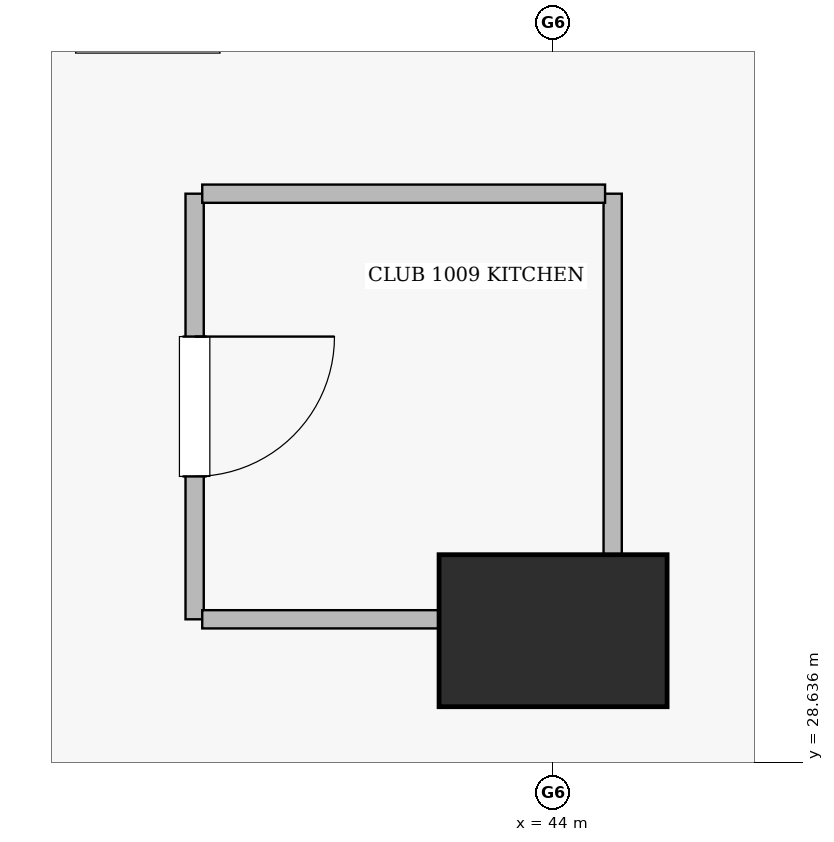
"""IFC4 building model, lengths in metres.
Left out: names, types, materials, properties, quantities, classifications, styles, units other than length and angle.
Written with IfcOpenShell. Run it as: python <this file> out.ifc"""

import sys

from ifc_helpers import new_model, si_unit, direction, frame, frame_2d, origin, origin_2d, place, context, subcontext, project, spatial, rectangle, extrude, element, fill, save


model = new_model("IFC4")
c1 = context("Model", 3, precision=1e-05, world=origin(), true_north=direction((0.0, 1.0)))
c2 = subcontext(c1, "Body", "Model", "MODEL_VIEW")
j1 = project(units=[si_unit("LENGTHUNIT", "METRE"), si_unit("PLANEANGLEUNIT", "RADIAN")], contexts=[c1])
p1 = place(None, origin())
s1 = spatial("IfcSite", under=j1, at=p1, CompositionType="ELEMENT")
p2 = place(p1, origin())
s2 = spatial("IfcBuilding", under=s1, at=p2, CompositionType="ELEMENT")
p3 = place(p2, frame((0.0, 0.0, 39.4)))
s3 = spatial("IfcBuildingStorey", under=s2, at=p3, CompositionType="ELEMENT", Elevation=39.4)
p4 = place(p3, frame((44.0, 29.5, 0.0), z_axis=(0.0, 0.0, 1.0), x_axis=(1.0, 0.0, 0.0)))
e1 = element("IfcColumn", 1, at=p4, inside=s3, PredefinedType="COLUMN", context=c2, shape_type="SweptSolid", body=[
    extrude(rectangle(XDim=1.5, YDim=1.0, at=origin_2d()), origin(), (0.0, 0.0, 1.0), 3.4),
])
p5 = place(p3, frame((41.642, 32.375, 0.0), z_axis=(0.0, 0.0, 1.0), x_axis=(0.0, -1.0, 0.0)))
e2 = element("IfcWall", 2, at=p5, inside=s3, PredefinedType="PARTITIONING", context=c2, shape_type="SweptSolid", body=[
    extrude(rectangle(XDim=2.8, YDim=0.1, at=frame_2d((1.4, 0.0))), origin(), (0.0, 0.0, 1.0), 2.313),
])
p6 = place(p5, frame((0.94, 0.0, 0.0)))
e3 = element("IfcOpeningElement", 3, at=p6, cuts=e2, PredefinedType="OPENING", context=c2, shape_type="SweptSolid", body=[
    extrude(rectangle(XDim=0.92, YDim=2.1, at=frame_2d((0.46, 1.05))), frame((0.0, 0.06, 0.0), z_axis=(0.0, -1.0, 0.0), x_axis=(1.0, 0.0, 0.0)), (0.0, 0.0, 1.0), 0.12),
])
p7 = place(p3, frame((44.392, 29.575, 0.0), z_axis=(0.0, 0.0, 1.0), x_axis=(0.0, 1.0, 0.0)))
e4 = element("IfcWall", 4, at=p7, inside=s3, PredefinedType="PARTITIONING", context=c2, shape_type="SweptSolid", body=[
    extrude(rectangle(XDim=2.8, YDim=0.1, at=frame_2d((1.4, 0.0))), origin(), (0.0, 0.0, 1.0), 2.313),
])
p8 = place(p3, frame((44.342, 32.375, 0.0), z_axis=(0.0, 0.0, 1.0), x_axis=(-1.0, 0.0, 0.0)))
e5 = element("IfcWall", 5, at=p8, inside=s3, PredefinedType="PARTITIONING", context=c2, shape_type="SweptSolid", body=[
    extrude(rectangle(XDim=2.65, YDim=0.1, at=frame_2d((1.325, 0.0))), origin(), (0.0, 0.0, 1.0), 3.125),
])
p9 = place(p3, frame((41.692, 29.575, 0.0), z_axis=(0.0, 0.0, 1.0), x_axis=(1.0, 0.0, 0.0)))
e6 = element("IfcWall", 6, at=p9, inside=s3, PredefinedType="PARTITIONING", context=c2, shape_type="SweptSolid", body=[
    extrude(rectangle(XDim=2.65, YDim=0.1, at=frame_2d((1.325, 0.0))), origin(), (0.0, 0.0, 1.0), 2.313),
])
p10 = place(p6, origin())
e7 = element("IfcDoor", 7, at=p10, inside=s3, OperationType="SINGLE_SWING_LEFT", PredefinedType="DOOR", context=c2, shape_type="SweptSolid", body=[
    extrude(rectangle(XDim=0.92, YDim=2.1, at=frame_2d((0.46, 1.05))), frame((0.0, 0.025, 0.0), z_axis=(0.0, -1.0, 0.0), x_axis=(1.0, 0.0, 0.0)), (0.0, 0.0, 1.0), 0.05),
])
fill(e3, e7)
save(model, sys.argv[1])
